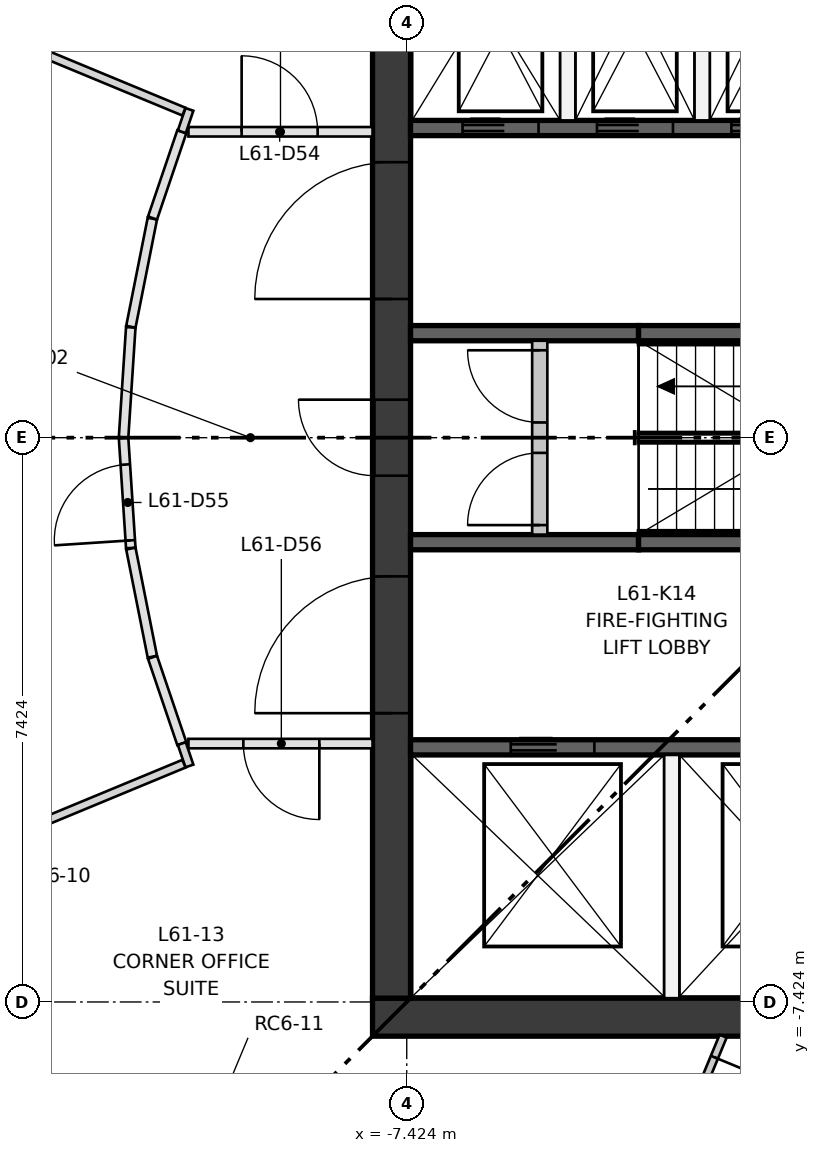
"""IFC4 building model, lengths in metres.
Left out: names, types, materials, properties, quantities, classifications, styles, units other than length and angle.
Written with IfcOpenShell. Run it as: python <this file> out.ifc"""

import sys

from ifc_helpers import new_model, si_unit, direction, frame, frame_2d, origin, place, context, subcontext, project, spatial, polyline, rectangle, outline, extrude, element, fill, save


model = new_model("IFC4")
c1 = context("Model", 3, precision=1e-05, world=origin(), true_north=direction((0.0, 1.0)))
c2 = subcontext(c1, "Body", "Model", "MODEL_VIEW")
j1 = project(units=[si_unit("LENGTHUNIT", "METRE"), si_unit("PLANEANGLEUNIT", "RADIAN")], contexts=[c1])
p1 = place(None, origin())
s1 = spatial("IfcSite", under=j1, at=p1, CompositionType="ELEMENT")
p2 = place(p1, origin())
s2 = spatial("IfcBuilding", under=s1, at=p2, CompositionType="ELEMENT")
p3 = place(p2, frame((0.0, 0.0, 224.5)))
s3 = spatial("IfcBuildingStorey", under=s2, at=p3, CompositionType="ELEMENT", Elevation=224.5)
p4 = place(p3, frame((-7.874, -7.624, 0.0), z_axis=(0.0, 0.0, 1.0), x_axis=(1.0, 0.0, 0.0)))
e1 = element("IfcWall", 1, at=p4, inside=s3, PredefinedType="SHEAR", context=c2, shape_type="SweptSolid", body=[
    extrude(rectangle(XDim=15.748, YDim=0.5, at=frame_2d((7.874, 0.0))), origin(), (0.0, 0.0, 1.0), 3.35),
])
p5 = place(p3, frame((-7.624, -7.374, 0.0), z_axis=(0.0, 0.0, 1.0), x_axis=(0.0, 1.0, 0.0)))
e2 = element("IfcWall", 2, at=p5, inside=s3, PredefinedType="SHEAR", context=c2, shape_type="SweptSolid", body=[
    extrude(rectangle(XDim=14.748, YDim=0.5, at=frame_2d((7.374, 0.0))), origin(), (0.0, 0.0, 1.0), 3.35),
])
p6 = place(p5, frame((6.874, 0.0, 0.0)))
e3 = element("IfcOpeningElement", 3, at=p6, cuts=e2, PredefinedType="OPENING", context=c2, shape_type="SweptSolid", body=[
    extrude(rectangle(XDim=1.0, YDim=2.1, at=frame_2d((0.5, 1.05))), frame((0.0, 0.26, 0.0), z_axis=(0.0, -1.0, 0.0), x_axis=(1.0, 0.0, 0.0)), (0.0, 0.0, 1.0), 0.52),
])
p7 = place(p5, frame((3.75, 0.0, 0.0)))
e4 = element("IfcOpeningElement", 4, at=p7, cuts=e2, PredefinedType="OPENING", context=c2, shape_type="SweptSolid", body=[
    extrude(rectangle(XDim=1.8, YDim=2.1, at=frame_2d((0.9, 1.05))), frame((0.0, 0.26, 0.0), z_axis=(0.0, -1.0, 0.0), x_axis=(1.0, 0.0, 0.0)), (0.0, 0.0, 1.0), 0.52),
])
p8 = place(p5, frame((9.198, 0.0, 0.0)))
e5 = element("IfcOpeningElement", 5, at=p8, cuts=e2, PredefinedType="OPENING", context=c2, shape_type="SweptSolid", body=[
    extrude(rectangle(XDim=1.8, YDim=2.1, at=frame_2d((0.9, 1.05))), frame((0.0, 0.26, 0.0), z_axis=(0.0, -1.0, 0.0), x_axis=(1.0, 0.0, 0.0)), (0.0, 0.0, 1.0), 0.52),
])
p9 = place(p3, frame((-7.374, -4.074, 0.0), z_axis=(0.0, 0.0, 1.0), x_axis=(1.0, 0.0, 0.0)))
e6 = element("IfcWall", 6, at=p9, inside=s3, PredefinedType="SHEAR", context=c2, shape_type="SweptSolid", body=[
    extrude(rectangle(XDim=14.748, YDim=0.2, at=frame_2d((7.374, 0.0))), origin(), (0.0, 0.0, 1.0), 3.0),
])
p10 = place(p9, frame((1.319, 0.0, 0.0)))
e7 = element("IfcOpeningElement", 7, at=p10, cuts=e6, PredefinedType="OPENING", context=c2, shape_type="SweptSolid", body=[
    extrude(rectangle(XDim=1.1, YDim=2.1, at=frame_2d((0.55, 1.05))), frame((0.0, 0.11, 0.0), z_axis=(0.0, -1.0, 0.0), x_axis=(1.0, 0.0, 0.0)), (0.0, 0.0, 1.0), 0.22),
])
p11 = place(p9, frame((4.456, 0.0, 0.0)))
e8 = element("IfcOpeningElement", 8, at=p11, cuts=e6, PredefinedType="OPENING", context=c2, shape_type="SweptSolid", body=[
    extrude(rectangle(XDim=1.1, YDim=2.1, at=frame_2d((0.55, 1.05))), frame((0.0, 0.11, 0.0), z_axis=(0.0, -1.0, 0.0), x_axis=(1.0, 0.0, 0.0)), (0.0, 0.0, 1.0), 0.22),
])
p12 = place(p9, frame((8.143, 0.0, 0.0)))
e9 = element("IfcOpeningElement", 9, at=p12, cuts=e6, PredefinedType="OPENING", context=c2, shape_type="SweptSolid", body=[
    extrude(rectangle(XDim=1.0, YDim=2.1, at=frame_2d((0.5, 1.05))), frame((0.0, 0.11, 0.0), z_axis=(0.0, -1.0, 0.0), x_axis=(1.0, 0.0, 0.0)), (0.0, 0.0, 1.0), 0.22),
])
p13 = place(p9, frame((12.379, 0.0, 0.0)))
e10 = element("IfcOpeningElement", 10, at=p13, cuts=e6, PredefinedType="OPENING", context=c2, shape_type="SweptSolid", body=[
    extrude(rectangle(XDim=0.8, YDim=2.1, at=frame_2d((0.4, 1.05))), frame((0.0, 0.11, 0.0), z_axis=(0.0, -1.0, 0.0), x_axis=(1.0, 0.0, 0.0)), (0.0, 0.0, 1.0), 0.22),
])
p14 = place(p3, frame((-7.374, 4.074, 0.0), z_axis=(0.0, 0.0, 1.0), x_axis=(1.0, 0.0, 0.0)))
e11 = element("IfcWall", 11, at=p14, inside=s3, PredefinedType="SHEAR", context=c2, shape_type="SweptSolid", body=[
    extrude(rectangle(XDim=7.374, YDim=0.2, at=frame_2d((3.687, 0.0))), origin(), (0.0, 0.0, 1.0), 3.0),
])
p15 = place(p14, frame((0.684, 0.0, 0.0)))
e12 = element("IfcOpeningElement", 12, at=p15, cuts=e11, PredefinedType="OPENING", context=c2, shape_type="SweptSolid", body=[
    extrude(rectangle(XDim=1.0, YDim=2.1, at=frame_2d((0.5, 1.05))), frame((0.0, 0.11, 0.0), z_axis=(0.0, -1.0, 0.0), x_axis=(1.0, 0.0, 0.0)), (0.0, 0.0, 1.0), 0.22),
])
p16 = place(p14, frame((2.453, 0.0, 0.0)))
e13 = element("IfcOpeningElement", 13, at=p16, cuts=e11, PredefinedType="OPENING", context=c2, shape_type="SweptSolid", body=[
    extrude(rectangle(XDim=1.0, YDim=2.1, at=frame_2d((0.5, 1.05))), frame((0.0, 0.11, 0.0), z_axis=(0.0, -1.0, 0.0), x_axis=(1.0, 0.0, 0.0)), (0.0, 0.0, 1.0), 0.22),
])
p17 = place(p14, frame((4.221, 0.0, 0.0)))
e14 = element("IfcOpeningElement", 14, at=p17, cuts=e11, PredefinedType="OPENING", context=c2, shape_type="SweptSolid", body=[
    extrude(rectangle(XDim=1.0, YDim=2.1, at=frame_2d((0.5, 1.05))), frame((0.0, 0.11, 0.0), z_axis=(0.0, -1.0, 0.0), x_axis=(1.0, 0.0, 0.0)), (0.0, 0.0, 1.0), 0.22),
])
p18 = place(p14, frame((5.99, 0.0, 0.0)))
e15 = element("IfcOpeningElement", 15, at=p18, cuts=e11, PredefinedType="OPENING", context=c2, shape_type="SweptSolid", body=[
    extrude(rectangle(XDim=1.0, YDim=2.1, at=frame_2d((0.5, 1.05))), frame((0.0, 0.11, 0.0), z_axis=(0.0, -1.0, 0.0), x_axis=(1.0, 0.0, 0.0)), (0.0, 0.0, 1.0), 0.22),
])
p19 = place(p3, frame((-7.374, -1.375, 0.0), z_axis=(0.0, 0.0, 1.0), x_axis=(1.0, 0.0, 0.0)))
e16 = element("IfcWall", 16, at=p19, inside=s3, PredefinedType="SHEAR", context=c2, shape_type="SweptSolid", body=[
    extrude(rectangle(XDim=3.0, YDim=0.2, at=frame_2d((1.5, 0.0))), origin(), (0.0, 0.0, 1.0), 3.0),
])
p20 = place(p3, frame((-4.374, -1.375, 0.0), z_axis=(0.0, 0.0, 1.0), x_axis=(1.0, 0.0, 0.0)))
e17 = element("IfcWall", 17, at=p20, inside=s3, PredefinedType="SHEAR", context=c2, shape_type="SweptSolid", body=[
    extrude(rectangle(XDim=4.374, YDim=0.2, at=frame_2d((2.187, 0.0))), origin(), (0.0, 0.0, 1.0), 3.0),
])
p21 = place(p3, frame((-7.374, 1.375, 0.0), z_axis=(0.0, 0.0, 1.0), x_axis=(1.0, 0.0, 0.0)))
e18 = element("IfcWall", 18, at=p21, inside=s3, PredefinedType="SHEAR", context=c2, shape_type="SweptSolid", body=[
    extrude(rectangle(XDim=3.0, YDim=0.2, at=frame_2d((1.5, 0.0))), origin(), (0.0, 0.0, 1.0), 3.0),
])
p22 = place(p3, frame((-4.374, 1.375, 0.0), z_axis=(0.0, 0.0, 1.0), x_axis=(1.0, 0.0, 0.0)))
e19 = element("IfcWall", 19, at=p22, inside=s3, PredefinedType="SHEAR", context=c2, shape_type="SweptSolid", body=[
    extrude(rectangle(XDim=4.374, YDim=0.2, at=frame_2d((2.187, 0.0))), origin(), (0.0, 0.0, 1.0), 3.0),
])
for number, where, z_axis, x_axis in (
    (20, (-3.937, -7.374, 0.0), (0.0, 0.0, 1.0), (0.0, 1.0, 0.0)),
    (21, (-5.305, 4.174, 0.0), (0.0, 0.0, 1.0), (0.0, 1.0, 0.0)),
    (22, (-3.537, 4.174, 0.0), (0.0, 0.0, 1.0), (0.0, 1.0, 0.0)),
):
    element("IfcWall", number, at=place(p3, frame(where, z_axis=z_axis, x_axis=x_axis)), inside=s3, PredefinedType="PARTITIONING", context=c2, shape_type="SweptSolid", body=[
        extrude(rectangle(XDim=3.2, YDim=0.2, at=frame_2d((1.6, 0.0))), origin(), (0.0, 0.0, 1.0), 3.0),
    ])
p23 = place(p3, frame((-5.674, -1.275, 0.0), z_axis=(0.0, 0.0, 1.0), x_axis=(0.0, 1.0, 0.0)))
e23 = element("IfcWall", 23, at=p23, inside=s3, PredefinedType="PARTITIONING", context=c2, shape_type="SweptSolid", body=[
    extrude(rectangle(XDim=2.55, YDim=0.2, at=frame_2d((1.275, 0.0))), origin(), (0.0, 0.0, 1.0), 3.0),
])
p24 = place(p23, frame((0.125, 0.0, 0.0)))
e24 = element("IfcOpeningElement", 24, at=p24, cuts=e23, PredefinedType="OPENING", context=c2, shape_type="SweptSolid", body=[
    extrude(rectangle(XDim=0.95, YDim=2.1, at=frame_2d((0.475, 1.05))), frame((0.0, 0.11, 0.0), z_axis=(0.0, -1.0, 0.0), x_axis=(1.0, 0.0, 0.0)), (0.0, 0.0, 1.0), 0.22),
])
p25 = place(p23, frame((1.475, 0.0, 0.0)))
e25 = element("IfcOpeningElement", 25, at=p25, cuts=e23, PredefinedType="OPENING", context=c2, shape_type="SweptSolid", body=[
    extrude(rectangle(XDim=0.95, YDim=2.1, at=frame_2d((0.475, 1.05))), frame((0.0, 0.11, 0.0), z_axis=(0.0, -1.0, 0.0), x_axis=(1.0, 0.0, 0.0)), (0.0, 0.0, 1.0), 0.22),
])
p26 = place(p3, frame((-12.934, -8.643, 0.0), z_axis=(-0.755344730477, -0.619832994913, 0.212747259813), x_axis=(0.634353703321, -0.77304293478, -8.415613e-06)))
e26 = element("IfcWall", 26, at=p26, inside=s3, PredefinedType="SOLIDWALL", context=c2, shape_type="SweptSolid", body=[
    extrude(outline(polyline([(0.0, 0.0), (2.594, 0.0), (2.575, 0.921), (0.019, 0.921), (0.0, 0.0)])), origin(), (0.0, 0.0, -1.0), 0.3),
])
p27 = place(p3, frame((-10.296, 4.024, 0.0), z_axis=(0.0, 0.0, 1.0), x_axis=(1.0, 0.0, 0.0)))
e27 = element("IfcWall", 27, at=p27, inside=s3, PredefinedType="PARTITIONING", context=c2, shape_type="SweptSolid", body=[
    extrude(rectangle(XDim=2.422, YDim=0.125, at=frame_2d((1.211, 0.0))), origin(), (0.0, 0.0, 1.0), 3.0),
])
p28 = place(p27, frame((0.7, 0.0, 0.0)))
e28 = element("IfcOpeningElement", 28, at=p28, cuts=e27, PredefinedType="OPENING", context=c2, shape_type="SweptSolid", body=[
    extrude(rectangle(XDim=1.0, YDim=2.1, at=frame_2d((0.5, 1.05))), frame((0.0, 0.073, 0.0), z_axis=(0.0, -1.0, 0.0), x_axis=(1.0, 0.0, 0.0)), (0.0, 0.0, 1.0), 0.145),
])
p29 = place(p3, frame((-11.15, 0.004, 0.0), z_axis=(0.0, 0.0, 1.0), x_axis=(0.065312343013, 0.997864869534, 0.0)))
e29 = element("IfcWall", 29, at=p29, inside=s3, PredefinedType="PARTITIONING", context=c2, shape_type="SweptSolid", body=[
    extrude(rectangle(XDim=1.45, YDim=0.125, at=frame_2d((0.725, 0.0))), origin(), (0.0, 0.0, 1.0), 3.0),
])
p30 = place(p3, frame((-11.055, -1.451, 0.0), z_axis=(0.0, 0.0, 1.0), x_axis=(-0.065312343013, 0.997864869534, 0.0)))
e30 = element("IfcWall", 30, at=p30, inside=s3, PredefinedType="PARTITIONING", context=c2, shape_type="SweptSolid", body=[
    extrude(rectangle(XDim=1.45, YDim=0.125, at=frame_2d((0.725, 0.0))), origin(), (0.0, 0.0, 1.0), 3.0),
])
p31 = place(p30, frame((0.1, 0.0, 0.0)))
e31 = element("IfcOpeningElement", 31, at=p31, cuts=e30, PredefinedType="OPENING", context=c2, shape_type="SweptSolid", body=[
    extrude(rectangle(XDim=1.0, YDim=2.1, at=frame_2d((0.5, 1.05))), frame((0.0, 0.073, 0.0), z_axis=(0.0, -1.0, 0.0), x_axis=(1.0, 0.0, 0.0)), (0.0, 0.0, 1.0), 0.145),
])
for number, where, z_axis, x_axis in (
    (32, (-11.054, 1.459, 0.0), (0.0, 0.0, 1.0), (0.195, 0.981, 0.0)),
    (33, (-10.771, -2.882, 0.0), (0.0, 0.0, 1.0), (-0.195, 0.981, 0.0)),
):
    element("IfcWall", number, at=place(p3, frame(where, z_axis=z_axis, x_axis=x_axis)), inside=s3, PredefinedType="PARTITIONING", context=c2, shape_type="SweptSolid", body=[
        extrude(rectangle(XDim=1.45, YDim=0.125, at=frame_2d((0.725, 0.0))), origin(), (0.0, 0.0, 1.0), 3.0),
    ])
for number, where, z_axis, x_axis in (
    (34, (-10.769, 2.89, 0.0), (0.0, 0.0, 1.0), (0.321, 0.947, 0.0)),
    (35, (-10.384, -4.024, 0.0), (0.0, 0.0, 1.0), (-0.321, 0.947, 0.0)),
):
    element("IfcWall", number, at=place(p3, frame(where, z_axis=z_axis, x_axis=x_axis)), inside=s3, PredefinedType="PARTITIONING", context=c2, shape_type="SweptSolid", body=[
        extrude(rectangle(XDim=1.198, YDim=0.125, at=frame_2d((0.599, 0.0))), origin(), (0.0, 0.0, 1.0), 3.0),
    ])
p32 = place(p3, frame((-7.874, -4.024, 0.0), z_axis=(0.0, 0.0, 1.0), x_axis=(-1.0, 0.0, 0.0)))
e36 = element("IfcWall", 36, at=p32, inside=s3, PredefinedType="PARTITIONING", context=c2, shape_type="SweptSolid", body=[
    extrude(rectangle(XDim=2.422, YDim=0.125, at=frame_2d((1.211, 0.0))), origin(), (0.0, 0.0, 1.0), 3.0),
])
p33 = place(p32, frame((0.7, 0.0, 0.0)))
e37 = element("IfcOpeningElement", 37, at=p33, cuts=e36, PredefinedType="OPENING", context=c2, shape_type="SweptSolid", body=[
    extrude(rectangle(XDim=1.0, YDim=2.1, at=frame_2d((0.5, 1.05))), frame((0.0, 0.073, 0.0), z_axis=(0.0, -1.0, 0.0), x_axis=(1.0, 0.0, 0.0)), (0.0, 0.0, 1.0), 0.145),
])
p34 = place(p3, frame((-10.384, 4.024, 0.0), z_axis=(0.0, 0.0, 1.0), x_axis=(0.320931919594, 0.947102266382, 0.0)))
e38 = element("IfcWall", 38, at=p34, inside=s3, PredefinedType="PARTITIONING", context=c2, shape_type="SweptSolid", body=[
    extrude(rectangle(XDim=0.311, YDim=0.11, at=frame_2d((0.156, 0.0))), origin(), (0.0, 0.0, 1.0), 3.0),
])
p35 = place(p3, frame((-10.356, 4.289, 0.0), z_axis=(0.0, 0.0, 1.0), x_axis=(-0.923838989754, 0.382781296578, 0.0)))
e39 = element("IfcWall", 39, at=p35, inside=s3, PredefinedType="PARTITIONING", context=c2, shape_type="SweptSolid", body=[
    extrude(rectangle(XDim=2.761, YDim=0.11, at=frame_2d((1.38, 0.0))), origin(), (0.0, 0.0, 1.0), 3.0),
])
p36 = place(p3, frame((-10.384, -4.024, 0.0), z_axis=(0.0, 0.0, 1.0), x_axis=(0.320931919594, -0.947102266382, 0.0)))
e40 = element("IfcWall", 40, at=p36, inside=s3, PredefinedType="PARTITIONING", context=c2, shape_type="SweptSolid", body=[
    extrude(rectangle(XDim=0.311, YDim=0.11, at=frame_2d((0.156, 0.0))), origin(), (0.0, 0.0, 1.0), 3.0),
])
p37 = place(p3, frame((-10.356, -4.289, 0.0), z_axis=(0.0, 0.0, 1.0), x_axis=(-0.923838989754, -0.382781296578, 0.0)))
e41 = element("IfcWall", 41, at=p37, inside=s3, PredefinedType="PARTITIONING", context=c2, shape_type="SweptSolid", body=[
    extrude(rectangle(XDim=2.761, YDim=0.11, at=frame_2d((1.38, 0.0))), origin(), (0.0, 0.0, 1.0), 3.0),
])
p38 = place(p3, frame((-3.261, -7.874, 0.0), z_axis=(0.0, 0.0, 1.0), x_axis=(-0.382718376354, -0.923865057463, 0.0)))
e42 = element("IfcWall", 42, at=p38, inside=s3, PredefinedType="PARTITIONING", context=c2, shape_type="SweptSolid", body=[
    extrude(rectangle(XDim=1.627, YDim=0.1, at=frame_2d((0.813, 0.0))), origin(), (0.0, 0.0, 1.0), 3.0),
])
p39 = place(p38, frame((0.3, 0.0, 0.0)))
e43 = element("IfcOpeningElement", 43, at=p39, cuts=e42, PredefinedType="OPENING", context=c2, shape_type="SweptSolid", body=[
    extrude(rectangle(XDim=1.0, YDim=2.1, at=frame_2d((0.5, 1.05))), frame((0.0, 0.06, 0.0), z_axis=(0.0, -1.0, 0.0), x_axis=(1.0, 0.0, 0.0)), (0.0, 0.0, 1.0), 0.12),
])
p40 = place(p10, origin())
e44 = element("IfcDoor", 44, at=p40, inside=s3, OperationType="DOUBLE_DOOR_SLIDING", PredefinedType="DOOR", context=c2, shape_type="SweptSolid", body=[
    extrude(rectangle(XDim=1.1, YDim=2.1, at=frame_2d((0.55, 1.05))), frame((0.0, 0.025, 0.0), z_axis=(0.0, -1.0, 0.0), x_axis=(1.0, 0.0, 0.0)), (0.0, 0.0, 1.0), 0.05),
])
fill(e7, e44)
p41 = place(p15, frame((1.0, 0.0, 0.0), z_axis=(0.0, 0.0, 1.0), x_axis=(-1.0, 0.0, 0.0)))
e45 = element("IfcDoor", 45, at=p41, inside=s3, OperationType="DOUBLE_DOOR_SLIDING", PredefinedType="DOOR", context=c2, shape_type="SweptSolid", body=[
    extrude(rectangle(XDim=1.0, YDim=2.1, at=frame_2d((0.5, 1.05))), frame((0.0, 0.025, 0.0), z_axis=(0.0, -1.0, 0.0), x_axis=(1.0, 0.0, 0.0)), (0.0, 0.0, 1.0), 0.05),
])
fill(e12, e45)
p42 = place(p16, frame((1.0, 0.0, 0.0), z_axis=(0.0, 0.0, 1.0), x_axis=(-1.0, 0.0, 0.0)))
e46 = element("IfcDoor", 46, at=p42, inside=s3, OperationType="DOUBLE_DOOR_SLIDING", PredefinedType="DOOR", context=c2, shape_type="SweptSolid", body=[
    extrude(rectangle(XDim=1.0, YDim=2.1, at=frame_2d((0.5, 1.05))), frame((0.0, 0.025, 0.0), z_axis=(0.0, -1.0, 0.0), x_axis=(1.0, 0.0, 0.0)), (0.0, 0.0, 1.0), 0.05),
])
fill(e13, e46)
p43 = place(p17, frame((1.0, 0.0, 0.0), z_axis=(0.0, 0.0, 1.0), x_axis=(-1.0, 0.0, 0.0)))
e47 = element("IfcDoor", 47, at=p43, inside=s3, OperationType="DOUBLE_DOOR_SLIDING", PredefinedType="DOOR", context=c2, shape_type="SweptSolid", body=[
    extrude(rectangle(XDim=1.0, YDim=2.1, at=frame_2d((0.5, 1.05))), frame((0.0, 0.025, 0.0), z_axis=(0.0, -1.0, 0.0), x_axis=(1.0, 0.0, 0.0)), (0.0, 0.0, 1.0), 0.05),
])
fill(e14, e47)
p44 = place(p24, origin())
e48 = element("IfcDoor", 48, at=p44, inside=s3, OperationType="SINGLE_SWING_LEFT", PredefinedType="DOOR", context=c2, shape_type="SweptSolid", body=[
    extrude(rectangle(XDim=0.95, YDim=2.1, at=frame_2d((0.475, 1.05))), frame((0.0, 0.025, 0.0), z_axis=(0.0, -1.0, 0.0), x_axis=(1.0, 0.0, 0.0)), (0.0, 0.0, 1.0), 0.05),
])
fill(e24, e48)
p45 = place(p25, origin())
e49 = element("IfcDoor", 49, at=p45, inside=s3, OperationType="SINGLE_SWING_RIGHT", PredefinedType="DOOR", context=c2, shape_type="SweptSolid", body=[
    extrude(rectangle(XDim=0.95, YDim=2.1, at=frame_2d((0.475, 1.05))), frame((0.0, 0.025, 0.0), z_axis=(0.0, -1.0, 0.0), x_axis=(1.0, 0.0, 0.0)), (0.0, 0.0, 1.0), 0.05),
])
fill(e25, e49)
p46 = place(p6, origin())
e50 = element("IfcDoor", 50, at=p46, inside=s3, OperationType="SINGLE_SWING_RIGHT", PredefinedType="DOOR", context=c2, shape_type="SweptSolid", body=[
    extrude(rectangle(XDim=1.0, YDim=2.1, at=frame_2d((0.5, 1.05))), frame((0.0, 0.25, 0.0), z_axis=(0.0, -1.0, 0.0), x_axis=(1.0, 0.0, 0.0)), (0.0, 0.0, 1.0), 0.05),
])
fill(e3, e50)
p47 = place(p7, origin())
e51 = element("IfcDoor", 51, at=p47, inside=s3, OperationType="DOUBLE_DOOR_SINGLE_SWING", PredefinedType="DOOR", context=c2, shape_type="SweptSolid", body=[
    extrude(rectangle(XDim=1.8, YDim=2.1, at=frame_2d((0.9, 1.05))), frame((0.0, 0.025, 0.0), z_axis=(0.0, -1.0, 0.0), x_axis=(1.0, 0.0, 0.0)), (0.0, 0.0, 1.0), 0.05),
])
fill(e4, e51)
p48 = place(p8, origin())
e52 = element("IfcDoor", 52, at=p48, inside=s3, OperationType="DOUBLE_DOOR_SINGLE_SWING", PredefinedType="DOOR", context=c2, shape_type="SweptSolid", body=[
    extrude(rectangle(XDim=1.8, YDim=2.1, at=frame_2d((0.9, 1.05))), frame((0.0, 0.025, 0.0), z_axis=(0.0, -1.0, 0.0), x_axis=(1.0, 0.0, 0.0)), (0.0, 0.0, 1.0), 0.05),
])
fill(e5, e52)
p49 = place(p28, origin())
e53 = element("IfcDoor", 53, at=p49, inside=s3, OperationType="SINGLE_SWING_LEFT", PredefinedType="DOOR", context=c2, shape_type="SweptSolid", body=[
    extrude(rectangle(XDim=1.0, YDim=2.1, at=frame_2d((0.5, 1.05))), frame((0.0, 0.025, 0.0), z_axis=(0.0, -1.0, 0.0), x_axis=(1.0, 0.0, 0.0)), (0.0, 0.0, 1.0), 0.05),
])
fill(e28, e53)
p50 = place(p31, origin())
e54 = element("IfcDoor", 54, at=p50, inside=s3, OperationType="SINGLE_SWING_LEFT", PredefinedType="DOOR", context=c2, shape_type="SweptSolid", body=[
    extrude(rectangle(XDim=1.0, YDim=2.1, at=frame_2d((0.5, 1.05))), frame((0.0, 0.025, 0.0), z_axis=(0.0, -1.0, 0.0), x_axis=(1.0, 0.0, 0.0)), (0.0, 0.0, 1.0), 0.05),
])
fill(e31, e54)
p51 = place(p33, origin())
e55 = element("IfcDoor", 55, at=p51, inside=s3, OperationType="SINGLE_SWING_LEFT", PredefinedType="DOOR", context=c2, shape_type="SweptSolid", body=[
    extrude(rectangle(XDim=1.0, YDim=2.1, at=frame_2d((0.5, 1.05))), frame((0.0, 0.025, 0.0), z_axis=(0.0, -1.0, 0.0), x_axis=(1.0, 0.0, 0.0)), (0.0, 0.0, 1.0), 0.05),
])
fill(e37, e55)
p52 = place(p39, origin())
e56 = element("IfcDoor", 56, at=p52, inside=s3, OperationType="SINGLE_SWING_LEFT", PredefinedType="DOOR", context=c2, shape_type="SweptSolid", body=[
    extrude(rectangle(XDim=1.0, YDim=2.1, at=frame_2d((0.5, 1.05))), frame((0.0, 0.025, 0.0), z_axis=(0.0, -1.0, 0.0), x_axis=(1.0, 0.0, 0.0)), (0.0, 0.0, 1.0), 0.05),
])
fill(e43, e56)
save(model, sys.argv[1])
